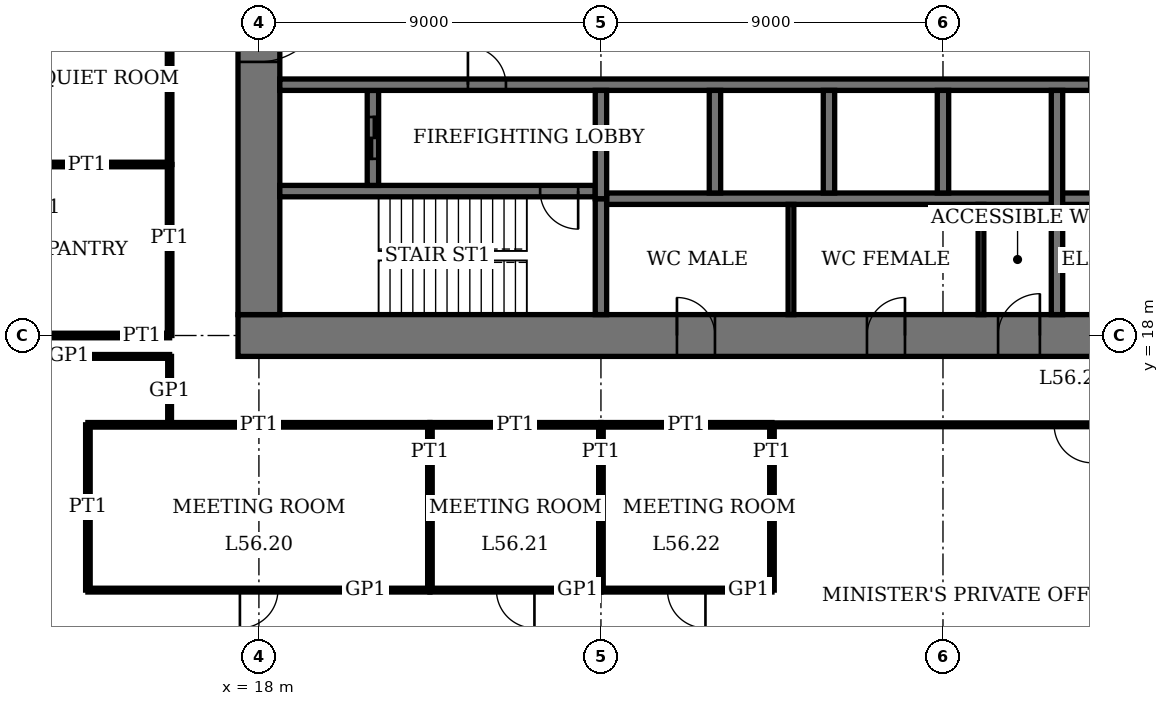
"""IFC4 building model, lengths in metres.
Left out: names, types, materials, properties, quantities, classifications, styles, units other than length and angle.
Written with IfcOpenShell. Run it as: python <this file> out.ifc"""

import sys

from ifc_helpers import new_model, si_unit, direction, frame, frame_2d, origin, place, context, subcontext, project, spatial, rectangle, extrude, element, fill, save


model = new_model("IFC4")
c1 = context("Model", 3, precision=1e-05, world=origin(), true_north=direction((0.0, 1.0)))
c2 = subcontext(c1, "Body", "Model", "MODEL_VIEW")
j1 = project(units=[si_unit("LENGTHUNIT", "METRE"), si_unit("PLANEANGLEUNIT", "RADIAN")], contexts=[c1])
p1 = place(None, origin())
s1 = spatial("IfcSite", under=j1, at=p1, CompositionType="ELEMENT")
p2 = place(p1, origin())
s2 = spatial("IfcBuilding", under=s1, at=p2, CompositionType="ELEMENT")
p3 = place(p2, frame((0.0, 0.0, 230.2)))
s3 = spatial("IfcBuildingStorey", under=s2, at=p3, CompositionType="ELEMENT", Elevation=230.2)
p4 = place(p3, frame((17.45, 18.0, 0.0), z_axis=(0.0, 0.0, 1.0), x_axis=(1.0, 0.0, 0.0)))
e1 = element("IfcWall", 1, at=p4, inside=s3, PredefinedType="SHEAR", context=c2, shape_type="SweptSolid", body=[
    extrude(rectangle(XDim=28.1, YDim=1.1, at=frame_2d((14.05, 0.0))), origin(), (0.0, 0.0, 1.0), 4.2),
])
p5 = place(p4, frame((11.55, 0.0, 0.0)))
e2 = element("IfcOpeningElement", 2, at=p5, cuts=e1, PredefinedType="OPENING", context=c2, shape_type="SweptSolid", body=[
    extrude(rectangle(XDim=1.0, YDim=2.4, at=frame_2d((0.5, 1.2))), frame((0.0, 0.56, 0.0), z_axis=(0.0, -1.0, 0.0), x_axis=(1.0, 0.0, 0.0)), (0.0, 0.0, 1.0), 1.12),
])
p6 = place(p4, frame((16.55, 0.0, 0.0)))
e3 = element("IfcOpeningElement", 3, at=p6, cuts=e1, PredefinedType="OPENING", context=c2, shape_type="SweptSolid", body=[
    extrude(rectangle(XDim=1.0, YDim=2.4, at=frame_2d((0.5, 1.2))), frame((0.0, 0.56, 0.0), z_axis=(0.0, -1.0, 0.0), x_axis=(1.0, 0.0, 0.0)), (0.0, 0.0, 1.0), 1.12),
])
p7 = place(p4, frame((20.0, 0.0, 0.0)))
e4 = element("IfcOpeningElement", 4, at=p7, cuts=e1, PredefinedType="OPENING", context=c2, shape_type="SweptSolid", body=[
    extrude(rectangle(XDim=1.1, YDim=2.4, at=frame_2d((0.55, 1.2))), frame((0.0, 0.56, 0.0), z_axis=(0.0, -1.0, 0.0), x_axis=(1.0, 0.0, 0.0)), (0.0, 0.0, 1.0), 1.12),
])
p8 = place(p4, frame((24.05, 0.0, 0.0)))
e5 = element("IfcOpeningElement", 5, at=p8, cuts=e1, PredefinedType="OPENING", context=c2, shape_type="SweptSolid", body=[
    extrude(rectangle(XDim=1.0, YDim=2.4, at=frame_2d((0.5, 1.2))), frame((0.0, 0.56, 0.0), z_axis=(0.0, -1.0, 0.0), x_axis=(1.0, 0.0, 0.0)), (0.0, 0.0, 1.0), 1.12),
])
p9 = place(p3, frame((18.0, 35.45, 0.0), z_axis=(0.0, 0.0, 1.0), x_axis=(0.0, -1.0, 0.0)))
e6 = element("IfcWall", 6, at=p9, inside=s3, PredefinedType="SHEAR", context=c2, shape_type="SweptSolid", body=[
    extrude(rectangle(XDim=16.9, YDim=1.1, at=frame_2d((8.45, 0.0))), origin(), (0.0, 0.0, 1.0), 4.2),
])
p10 = place(p9, frame((8.45, 0.0, 0.0)))
e7 = element("IfcOpeningElement", 7, at=p10, cuts=e6, PredefinedType="OPENING", context=c2, shape_type="SweptSolid", body=[
    extrude(rectangle(XDim=1.8, YDim=2.4, at=frame_2d((0.9, 1.2))), frame((0.0, 0.56, 0.0), z_axis=(0.0, -1.0, 0.0), x_axis=(1.0, 0.0, 0.0)), (0.0, 0.0, 1.0), 1.12),
])
p11 = place(p3, frame((18.55, 21.8, 0.0), z_axis=(0.0, 0.0, 1.0), x_axis=(1.0, 0.0, 0.0)))
e8 = element("IfcWall", 8, at=p11, inside=s3, PredefinedType="SHEAR", context=c2, shape_type="SweptSolid", body=[
    extrude(rectangle(XDim=8.3, YDim=0.3, at=frame_2d((4.15, 0.0))), origin(), (0.0, 0.0, 1.0), 4.2),
])
p12 = place(p11, frame((6.85, 0.0, 0.0)))
e9 = element("IfcOpeningElement", 9, at=p12, cuts=e8, PredefinedType="OPENING", context=c2, shape_type="SweptSolid", body=[
    extrude(rectangle(XDim=1.0, YDim=2.4, at=frame_2d((0.5, 1.2))), frame((0.0, 0.16, 0.0), z_axis=(0.0, -1.0, 0.0), x_axis=(1.0, 0.0, 0.0)), (0.0, 0.0, 1.0), 0.32),
])
p13 = place(p3, frame((27.0, 18.55, 0.0), z_axis=(0.0, 0.0, 1.0), x_axis=(0.0, 1.0, 0.0)))
e10 = element("IfcWall", 10, at=p13, inside=s3, PredefinedType="SHEAR", context=c2, shape_type="SweptSolid", body=[
    extrude(rectangle(XDim=3.05, YDim=0.3, at=frame_2d((1.525, 0.0))), origin(), (0.0, 0.0, 1.0), 4.2),
])
p14 = place(p3, frame((21.0, 21.95, 0.0), z_axis=(0.0, 0.0, 1.0), x_axis=(0.0, 1.0, 0.0)))
e11 = element("IfcWall", 11, at=p14, inside=s3, PredefinedType="SHEAR", context=c2, shape_type="SweptSolid", body=[
    extrude(rectangle(XDim=2.5, YDim=0.3, at=frame_2d((1.25, 0.0))), origin(), (0.0, 0.0, 1.0), 4.2),
])
p15 = place(p14, frame((0.7, 0.0, 0.0)))
e12 = element("IfcOpeningElement", 12, at=p15, cuts=e11, PredefinedType="OPENING", context=c2, shape_type="SweptSolid", body=[
    extrude(rectangle(XDim=1.1, YDim=2.4, at=frame_2d((0.55, 1.2))), frame((0.0, 0.16, 0.0), z_axis=(0.0, -1.0, 0.0), x_axis=(1.0, 0.0, 0.0)), (0.0, 0.0, 1.0), 0.32),
])
p16 = place(p3, frame((18.55, 24.6, 0.0), z_axis=(0.0, 0.0, 1.0), x_axis=(1.0, 0.0, 0.0)))
e13 = element("IfcWall", 13, at=p16, inside=s3, PredefinedType="SHEAR", context=c2, shape_type="SweptSolid", body=[
    extrude(rectangle(XDim=25.9, YDim=0.3, at=frame_2d((12.95, 0.0))), origin(), (0.0, 0.0, 1.0), 4.2),
])
p17 = place(p16, frame((4.95, 0.0, 0.0)))
e14 = element("IfcOpeningElement", 14, at=p17, cuts=e13, PredefinedType="OPENING", context=c2, shape_type="SweptSolid", body=[
    extrude(rectangle(XDim=1.0, YDim=2.4, at=frame_2d((0.5, 1.2))), frame((0.0, 0.16, 0.0), z_axis=(0.0, -1.0, 0.0), x_axis=(1.0, 0.0, 0.0)), (0.0, 0.0, 1.0), 0.32),
])
p18 = place(p16, frame((24.5, 0.0, 0.0)))
e15 = element("IfcOpeningElement", 15, at=p18, cuts=e13, PredefinedType="OPENING", context=c2, shape_type="SweptSolid", body=[
    extrude(rectangle(XDim=0.9, YDim=2.1, at=frame_2d((0.45, 1.05))), frame((0.0, 0.16, 0.0), z_axis=(0.0, -1.0, 0.0), x_axis=(1.0, 0.0, 0.0)), (0.0, 0.0, 1.0), 0.32),
])
p19 = place(p16, frame((21.3, 0.0, 0.0)))
e16 = element("IfcOpeningElement", 16, at=p19, cuts=e13, PredefinedType="OPENING", context=c2, shape_type="SweptSolid", body=[
    extrude(rectangle(XDim=1.3, YDim=2.4, at=frame_2d((0.65, 1.2))), frame((0.0, 0.16, 0.0), z_axis=(0.0, -1.0, 0.0), x_axis=(1.0, 0.0, 0.0)), (0.0, 0.0, 1.0), 0.32),
])
p20 = place(p3, frame((27.15, 21.6, 0.0), z_axis=(0.0, 0.0, 1.0), x_axis=(1.0, 0.0, 0.0)))
e17 = element("IfcWall", 17, at=p20, inside=s3, PredefinedType="SHEAR", context=c2, shape_type="SweptSolid", body=[
    extrude(rectangle(XDim=17.3, YDim=0.3, at=frame_2d((8.65, 0.0))), origin(), (0.0, 0.0, 1.0), 4.2),
])
for number, where, z_axis, x_axis in (
    (18, (30.0, 21.75, 0.0), (0.0, 0.0, 1.0), (0.0, 1.0, 0.0)),
    (19, (33.0, 21.75, 0.0), (0.0, 0.0, 1.0), (0.0, 1.0, 0.0)),
    (20, (36.0, 21.75, 0.0), (0.0, 0.0, 1.0), (0.0, 1.0, 0.0)),
):
    element("IfcWall", number, at=place(p3, frame(where, z_axis=z_axis, x_axis=x_axis)), inside=s3, PredefinedType="SHEAR", context=c2, shape_type="SweptSolid", body=[
        extrude(rectangle(XDim=2.7, YDim=0.3, at=frame_2d((1.35, 0.0))), origin(), (0.0, 0.0, 1.0), 4.2),
    ])
p21 = place(p3, frame((39.0, 18.55, 0.0), z_axis=(0.0, 0.0, 1.0), x_axis=(0.0, 1.0, 0.0)))
e21 = element("IfcWall", 21, at=p21, inside=s3, PredefinedType="SHEAR", context=c2, shape_type="SweptSolid", body=[
    extrude(rectangle(XDim=5.9, YDim=0.3, at=frame_2d((2.95, 0.0))), origin(), (0.0, 0.0, 1.0), 4.2),
])
p22 = place(p3, frame((27.0, 21.6, 0.0), z_axis=(0.0, 0.0, 1.0), x_axis=(0.0, 1.0, 0.0)))
e22 = element("IfcWall", 22, at=p22, inside=s3, PredefinedType="SHEAR", context=c2, shape_type="SweptSolid", body=[
    extrude(rectangle(XDim=2.85, YDim=0.3, at=frame_2d((1.425, 0.0))), origin(), (0.0, 0.0, 1.0), 4.2),
])
p23 = place(p3, frame((13.5, 11.3, 0.0), z_axis=(0.0, 0.0, 1.0), x_axis=(1.0, 0.0, 0.0)))
e23 = element("IfcWall", 23, at=p23, inside=s3, PredefinedType="PARTITIONING", context=c2, shape_type="SweptSolid", body=[
    extrude(rectangle(XDim=9.0, YDim=0.1, at=frame_2d((4.5, 0.0))), origin(), (0.0, 0.0, 1.0), 3.85),
])
p24 = place(p23, frame((4.0, 0.0, 0.0)))
e24 = element("IfcOpeningElement", 24, at=p24, cuts=e23, PredefinedType="OPENING", context=c2, shape_type="SweptSolid", body=[
    extrude(rectangle(XDim=1.0, YDim=2.4, at=frame_2d((0.5, 1.2))), frame((0.0, 0.06, 0.0), z_axis=(0.0, -1.0, 0.0), x_axis=(1.0, 0.0, 0.0)), (0.0, 0.0, 1.0), 0.12),
])
p25 = place(p3, frame((22.5, 11.3, 0.0), z_axis=(0.0, 0.0, 1.0), x_axis=(1.0, 0.0, 0.0)))
e25 = element("IfcWall", 25, at=p25, inside=s3, PredefinedType="PARTITIONING", context=c2, shape_type="SweptSolid", body=[
    extrude(rectangle(XDim=4.5, YDim=0.1, at=frame_2d((2.25, 0.0))), origin(), (0.0, 0.0, 1.0), 3.85),
])
p26 = place(p25, frame((1.75, 0.0, 0.0)))
e26 = element("IfcOpeningElement", 26, at=p26, cuts=e25, PredefinedType="OPENING", context=c2, shape_type="SweptSolid", body=[
    extrude(rectangle(XDim=1.0, YDim=2.4, at=frame_2d((0.5, 1.2))), frame((0.0, 0.06, 0.0), z_axis=(0.0, -1.0, 0.0), x_axis=(1.0, 0.0, 0.0)), (0.0, 0.0, 1.0), 0.12),
])
p27 = place(p3, frame((27.0, 11.3, 0.0), z_axis=(0.0, 0.0, 1.0), x_axis=(1.0, 0.0, 0.0)))
e27 = element("IfcWall", 27, at=p27, inside=s3, PredefinedType="PARTITIONING", context=c2, shape_type="SweptSolid", body=[
    extrude(rectangle(XDim=4.5, YDim=0.1, at=frame_2d((2.25, 0.0))), origin(), (0.0, 0.0, 1.0), 3.85),
])
p28 = place(p27, frame((1.75, 0.0, 0.0)))
e28 = element("IfcOpeningElement", 28, at=p28, cuts=e27, PredefinedType="OPENING", context=c2, shape_type="SweptSolid", body=[
    extrude(rectangle(XDim=1.0, YDim=2.4, at=frame_2d((0.5, 1.2))), frame((0.0, 0.06, 0.0), z_axis=(0.0, -1.0, 0.0), x_axis=(1.0, 0.0, 0.0)), (0.0, 0.0, 1.0), 0.12),
])
p29 = place(p3, frame((13.5, 15.65, 0.0), z_axis=(0.0, 0.0, 1.0), x_axis=(1.0, 0.0, 0.0)))
e29 = element("IfcWall", 29, at=p29, inside=s3, PredefinedType="PARTITIONING", context=c2, shape_type="SweptSolid", body=[
    extrude(rectangle(XDim=9.0, YDim=0.12, at=frame_2d((4.5, 0.0))), origin(), (0.0, 0.0, 1.0), 3.85),
])
for number, where, z_axis, x_axis in (
    (30, (22.5, 15.65, 0.0), (0.0, 0.0, 1.0), (1.0, 0.0, 0.0)),
    (31, (27.0, 15.65, 0.0), (0.0, 0.0, 1.0), (1.0, 0.0, 0.0)),
):
    element("IfcWall", number, at=place(p3, frame(where, z_axis=z_axis, x_axis=x_axis)), inside=s3, PredefinedType="PARTITIONING", context=c2, shape_type="SweptSolid", body=[
        extrude(rectangle(XDim=4.5, YDim=0.12, at=frame_2d((2.25, 0.0))), origin(), (0.0, 0.0, 1.0), 3.85),
    ])
p30 = place(p3, frame((31.5, 15.65, 0.0), z_axis=(0.0, 0.0, 1.0), x_axis=(1.0, 0.0, 0.0)))
e32 = element("IfcWall", 32, at=p30, inside=s3, PredefinedType="PARTITIONING", context=c2, shape_type="SweptSolid", body=[
    extrude(rectangle(XDim=15.85, YDim=0.1, at=frame_2d((7.925, 0.0))), origin(), (0.0, 0.0, 1.0), 3.85),
])
p31 = place(p30, frame((7.425, 0.0, 0.0)))
e33 = element("IfcOpeningElement", 33, at=p31, cuts=e32, PredefinedType="OPENING", context=c2, shape_type="SweptSolid", body=[
    extrude(rectangle(XDim=1.0, YDim=2.4, at=frame_2d((0.5, 1.2))), frame((0.0, 0.06, 0.0), z_axis=(0.0, -1.0, 0.0), x_axis=(1.0, 0.0, 0.0)), (0.0, 0.0, 1.0), 0.12),
])
p32 = place(p3, frame((10.15, 17.45, 0.0), z_axis=(0.0, 0.0, 1.0), x_axis=(1.0, 0.0, 0.0)))
e34 = element("IfcWall", 34, at=p32, inside=s3, PredefinedType="PARTITIONING", context=c2, shape_type="SweptSolid", body=[
    extrude(rectangle(XDim=5.5, YDim=0.1, at=frame_2d((2.75, 0.0))), origin(), (0.0, 0.0, 1.0), 3.85),
])
p33 = place(p3, frame((11.3, 18.0, 0.0), z_axis=(0.0, 0.0, 1.0), x_axis=(1.0, 0.0, 0.0)))
e35 = element("IfcWall", 35, at=p33, inside=s3, PredefinedType="PARTITIONING", context=c2, shape_type="SweptSolid", body=[
    extrude(rectangle(XDim=4.35, YDim=0.12, at=frame_2d((2.175, 0.0))), origin(), (0.0, 0.0, 1.0), 3.25),
])
p34 = place(p3, frame((11.3, 22.5, 0.0), z_axis=(0.0, 0.0, 1.0), x_axis=(1.0, 0.0, 0.0)))
e36 = element("IfcWall", 36, at=p34, inside=s3, PredefinedType="PARTITIONING", context=c2, shape_type="SweptSolid", body=[
    extrude(rectangle(XDim=4.35, YDim=0.12, at=frame_2d((2.175, 0.0))), origin(), (0.0, 0.0, 1.0), 3.15),
])
p35 = place(p3, frame((13.5, 11.3, 0.0), z_axis=(0.0, 0.0, 1.0), x_axis=(0.0, 1.0, 0.0)))
e37 = element("IfcWall", 37, at=p35, inside=s3, PredefinedType="PARTITIONING", context=c2, shape_type="SweptSolid", body=[
    extrude(rectangle(XDim=4.35, YDim=0.12, at=frame_2d((2.175, 0.0))), origin(), (0.0, 0.0, 1.0), 3.85),
])
for number, where, z_axis, x_axis in (
    (38, (15.65, 18.0, 0.0), (0.0, 0.0, 1.0), (0.0, 1.0, 0.0)),
    (39, (15.65, 22.5, 0.0), (0.0, 0.0, 1.0), (0.0, 1.0, 0.0)),
):
    element("IfcWall", number, at=place(p3, frame(where, z_axis=z_axis, x_axis=x_axis)), inside=s3, PredefinedType="PARTITIONING", context=c2, shape_type="SweptSolid", body=[
        extrude(rectangle(XDim=4.5, YDim=0.12, at=frame_2d((2.25, 0.0))), origin(), (0.0, 0.0, 1.0), 3.85),
    ])
p36 = place(p3, frame((15.65, 15.65, 0.0), z_axis=(0.0, 0.0, 1.0), x_axis=(0.0, 1.0, 0.0)))
e40 = element("IfcWall", 40, at=p36, inside=s3, PredefinedType="PARTITIONING", context=c2, shape_type="SweptSolid", body=[
    extrude(rectangle(XDim=1.8, YDim=0.1, at=frame_2d((0.9, 0.0))), origin(), (0.0, 0.0, 1.0), 3.85),
])
p37 = place(p3, frame((22.5, 11.3, 0.0), z_axis=(0.0, 0.0, 1.0), x_axis=(0.0, 1.0, 0.0)))
e41 = element("IfcWall", 41, at=p37, inside=s3, PredefinedType="PARTITIONING", context=c2, shape_type="SweptSolid", body=[
    extrude(rectangle(XDim=4.35, YDim=0.12, at=frame_2d((2.175, 0.0))), origin(), (0.0, 0.0, 1.0), 3.85),
])
p38 = place(p3, frame((27.0, 11.3, 0.0), z_axis=(0.0, 0.0, 1.0), x_axis=(0.0, 1.0, 0.0)))
e42 = element("IfcWall", 42, at=p38, inside=s3, PredefinedType="PARTITIONING", context=c2, shape_type="SweptSolid", body=[
    extrude(rectangle(XDim=4.35, YDim=0.12, at=frame_2d((2.175, 0.0))), origin(), (0.0, 0.0, 1.0), 3.25),
])
p39 = place(p3, frame((31.5, 11.3, 0.0), z_axis=(0.0, 0.0, 1.0), x_axis=(0.0, 1.0, 0.0)))
e43 = element("IfcWall", 43, at=p39, inside=s3, PredefinedType="PARTITIONING", context=c2, shape_type="SweptSolid", body=[
    extrude(rectangle(XDim=4.35, YDim=0.12, at=frame_2d((2.175, 0.0))), origin(), (0.0, 0.0, 1.0), 3.85),
])
for number, where, z_axis, x_axis in (
    (44, (32.0, 18.55, 0.0), (0.0, 0.0, 1.0), (0.0, 1.0, 0.0)),
    (45, (37.0, 18.55, 0.0), (0.0, 0.0, 1.0), (0.0, 1.0, 0.0)),
):
    element("IfcWall", number, at=place(p3, frame(where, z_axis=z_axis, x_axis=x_axis)), inside=s3, PredefinedType="PARTITIONING", context=c2, shape_type="SweptSolid", body=[
        extrude(rectangle(XDim=2.9, YDim=0.15, at=frame_2d((1.45, 0.0))), origin(), (0.0, 0.0, 1.0), 3.85),
    ])
p40 = place(p10, origin())
e46 = element("IfcDoor", 46, at=p40, inside=s3, OperationType="DOUBLE_DOOR_DOUBLE_SWING", PredefinedType="DOOR", context=c2, shape_type="SweptSolid", body=[
    extrude(rectangle(XDim=1.8, YDim=2.4, at=frame_2d((0.9, 1.2))), frame((0.0, 0.03, 0.0), z_axis=(0.0, -1.0, 0.0), x_axis=(1.0, 0.0, 0.0)), (0.0, 0.0, 1.0), 0.06),
    extrude(rectangle(XDim=0.04, YDim=2.4, at=frame_2d((0.02, 1.2))), frame((0.0, 0.55, 0.0), z_axis=(0.0, -1.0, 0.0), x_axis=(1.0, 0.0, 0.0)), (0.0, 0.0, 1.0), 1.1),
    extrude(rectangle(XDim=0.04, YDim=2.4, at=frame_2d((1.78, 1.2))), frame((0.0, 0.55, 0.0), z_axis=(0.0, -1.0, 0.0), x_axis=(1.0, 0.0, 0.0)), (0.0, 0.0, 1.0), 1.1),
    extrude(rectangle(XDim=1.8, YDim=0.04, at=frame_2d((0.9, 2.38))), frame((0.0, 0.55, 0.0), z_axis=(0.0, -1.0, 0.0), x_axis=(1.0, 0.0, 0.0)), (0.0, 0.0, 1.0), 1.1),
])
fill(e7, e46)
p41 = place(p5, origin())
e47 = element("IfcDoor", 47, at=p41, inside=s3, OperationType="SINGLE_SWING_RIGHT", PredefinedType="DOOR", context=c2, shape_type="SweptSolid", body=[
    extrude(rectangle(XDim=1.0, YDim=2.4, at=frame_2d((0.5, 1.2))), frame((0.0, 0.025, 0.0), z_axis=(0.0, -1.0, 0.0), x_axis=(1.0, 0.0, 0.0)), (0.0, 0.0, 1.0), 0.05),
    extrude(rectangle(XDim=0.04, YDim=2.4, at=frame_2d((0.02, 1.2))), frame((0.0, 0.4, 0.0), z_axis=(0.0, -1.0, 0.0), x_axis=(1.0, 0.0, 0.0)), (0.0, 0.0, 1.0), 0.8),
    extrude(rectangle(XDim=0.04, YDim=2.4, at=frame_2d((0.98, 1.2))), frame((0.0, 0.4, 0.0), z_axis=(0.0, -1.0, 0.0), x_axis=(1.0, 0.0, 0.0)), (0.0, 0.0, 1.0), 0.8),
    extrude(rectangle(XDim=1.0, YDim=0.04, at=frame_2d((0.5, 2.38))), frame((0.0, 0.4, 0.0), z_axis=(0.0, -1.0, 0.0), x_axis=(1.0, 0.0, 0.0)), (0.0, 0.0, 1.0), 0.8),
])
fill(e2, e47)
p42 = place(p6, origin())
e48 = element("IfcDoor", 48, at=p42, inside=s3, OperationType="SINGLE_SWING_LEFT", PredefinedType="DOOR", context=c2, shape_type="SweptSolid", body=[
    extrude(rectangle(XDim=1.0, YDim=2.4, at=frame_2d((0.5, 1.2))), frame((0.0, 0.025, 0.0), z_axis=(0.0, -1.0, 0.0), x_axis=(1.0, 0.0, 0.0)), (0.0, 0.0, 1.0), 0.05),
    extrude(rectangle(XDim=0.04, YDim=2.4, at=frame_2d((0.02, 1.2))), frame((0.0, 0.4, 0.0), z_axis=(0.0, -1.0, 0.0), x_axis=(1.0, 0.0, 0.0)), (0.0, 0.0, 1.0), 0.8),
    extrude(rectangle(XDim=0.04, YDim=2.4, at=frame_2d((0.98, 1.2))), frame((0.0, 0.4, 0.0), z_axis=(0.0, -1.0, 0.0), x_axis=(1.0, 0.0, 0.0)), (0.0, 0.0, 1.0), 0.8),
    extrude(rectangle(XDim=1.0, YDim=0.04, at=frame_2d((0.5, 2.38))), frame((0.0, 0.4, 0.0), z_axis=(0.0, -1.0, 0.0), x_axis=(1.0, 0.0, 0.0)), (0.0, 0.0, 1.0), 0.8),
])
fill(e3, e48)
p43 = place(p7, origin())
e49 = element("IfcDoor", 49, at=p43, inside=s3, OperationType="SINGLE_SWING_LEFT", PredefinedType="DOOR", context=c2, shape_type="SweptSolid", body=[
    extrude(rectangle(XDim=1.1, YDim=2.4, at=frame_2d((0.55, 1.2))), frame((0.0, 0.025, 0.0), z_axis=(0.0, -1.0, 0.0), x_axis=(1.0, 0.0, 0.0)), (0.0, 0.0, 1.0), 0.05),
    extrude(rectangle(XDim=0.04, YDim=2.4, at=frame_2d((0.02, 1.2))), frame((0.0, 0.44, 0.0), z_axis=(0.0, -1.0, 0.0), x_axis=(1.0, 0.0, 0.0)), (0.0, 0.0, 1.0), 0.88),
    extrude(rectangle(XDim=0.04, YDim=2.4, at=frame_2d((1.08, 1.2))), frame((0.0, 0.44, 0.0), z_axis=(0.0, -1.0, 0.0), x_axis=(1.0, 0.0, 0.0)), (0.0, 0.0, 1.0), 0.88),
    extrude(rectangle(XDim=1.1, YDim=0.04, at=frame_2d((0.55, 2.38))), frame((0.0, 0.44, 0.0), z_axis=(0.0, -1.0, 0.0), x_axis=(1.0, 0.0, 0.0)), (0.0, 0.0, 1.0), 0.88),
])
fill(e4, e49)
p44 = place(p12, origin())
e50 = element("IfcDoor", 50, at=p44, inside=s3, OperationType="SINGLE_SWING_RIGHT", PredefinedType="DOOR", context=c2, shape_type="SweptSolid", body=[
    extrude(rectangle(XDim=1.0, YDim=2.4, at=frame_2d((0.5, 1.2))), frame((0.0, 0.03, 0.0), z_axis=(0.0, -1.0, 0.0), x_axis=(1.0, 0.0, 0.0)), (0.0, 0.0, 1.0), 0.06),
])
fill(e9, e50)
p45 = place(p17, origin())
e51 = element("IfcDoor", 51, at=p45, inside=s3, OperationType="SINGLE_SWING_RIGHT", PredefinedType="DOOR", context=c2, shape_type="SweptSolid", body=[
    extrude(rectangle(XDim=1.0, YDim=2.4, at=frame_2d((0.5, 1.2))), frame((0.0, 0.03, 0.0), z_axis=(0.0, -1.0, 0.0), x_axis=(1.0, 0.0, 0.0)), (0.0, 0.0, 1.0), 0.06),
])
fill(e14, e51)
p46 = place(p24, origin())
e52 = element("IfcDoor", 52, at=p46, inside=s3, OperationType="SINGLE_SWING_LEFT", PredefinedType="DOOR", context=c2, shape_type="SweptSolid", body=[
    extrude(rectangle(XDim=1.0, YDim=2.4, at=frame_2d((0.5, 1.2))), frame((0.0, 0.02, 0.0), z_axis=(0.0, -1.0, 0.0), x_axis=(1.0, 0.0, 0.0)), (0.0, 0.0, 1.0), 0.04),
])
fill(e24, e52)
p47 = place(p26, origin())
e53 = element("IfcDoor", 53, at=p47, inside=s3, OperationType="SINGLE_SWING_RIGHT", PredefinedType="DOOR", context=c2, shape_type="SweptSolid", body=[
    extrude(rectangle(XDim=1.0, YDim=2.4, at=frame_2d((0.5, 1.2))), frame((0.0, 0.02, 0.0), z_axis=(0.0, -1.0, 0.0), x_axis=(1.0, 0.0, 0.0)), (0.0, 0.0, 1.0), 0.04),
])
fill(e26, e53)
p48 = place(p28, origin())
e54 = element("IfcDoor", 54, at=p48, inside=s3, OperationType="SINGLE_SWING_RIGHT", PredefinedType="DOOR", context=c2, shape_type="SweptSolid", body=[
    extrude(rectangle(XDim=1.0, YDim=2.4, at=frame_2d((0.5, 1.2))), frame((0.0, 0.02, 0.0), z_axis=(0.0, -1.0, 0.0), x_axis=(1.0, 0.0, 0.0)), (0.0, 0.0, 1.0), 0.04),
])
fill(e28, e54)
p49 = place(p31, origin())
e55 = element("IfcDoor", 55, at=p49, inside=s3, OperationType="SINGLE_SWING_RIGHT", PredefinedType="DOOR", context=c2, shape_type="SweptSolid", body=[
    extrude(rectangle(XDim=1.0, YDim=2.4, at=frame_2d((0.5, 1.2))), frame((0.0, 0.02, 0.0), z_axis=(0.0, -1.0, 0.0), x_axis=(1.0, 0.0, 0.0)), (0.0, 0.0, 1.0), 0.04),
])
fill(e33, e55)
p50 = place(p19, origin())
e56 = element("IfcDoor", 56, at=p50, inside=s3, OperationType="DOUBLE_DOOR_SLIDING", PredefinedType="DOOR", context=c2, shape_type="SweptSolid", body=[
    extrude(rectangle(XDim=1.3, YDim=2.4, at=frame_2d((0.65, 1.2))), frame((0.0, 0.02, 0.0), z_axis=(0.0, -1.0, 0.0), x_axis=(1.0, 0.0, 0.0)), (0.0, 0.0, 1.0), 0.04),
])
fill(e16, e56)
p51 = place(p15, origin())
e57 = element("IfcDoor", 57, at=p51, inside=s3, OperationType="DOUBLE_DOOR_SLIDING", PredefinedType="DOOR", context=c2, shape_type="SweptSolid", body=[
    extrude(rectangle(XDim=1.1, YDim=2.4, at=frame_2d((0.55, 1.2))), frame((0.0, 0.03, 0.0), z_axis=(0.0, -1.0, 0.0), x_axis=(1.0, 0.0, 0.0)), (0.0, 0.0, 1.0), 0.06),
])
fill(e12, e57)
save(model, sys.argv[1])
